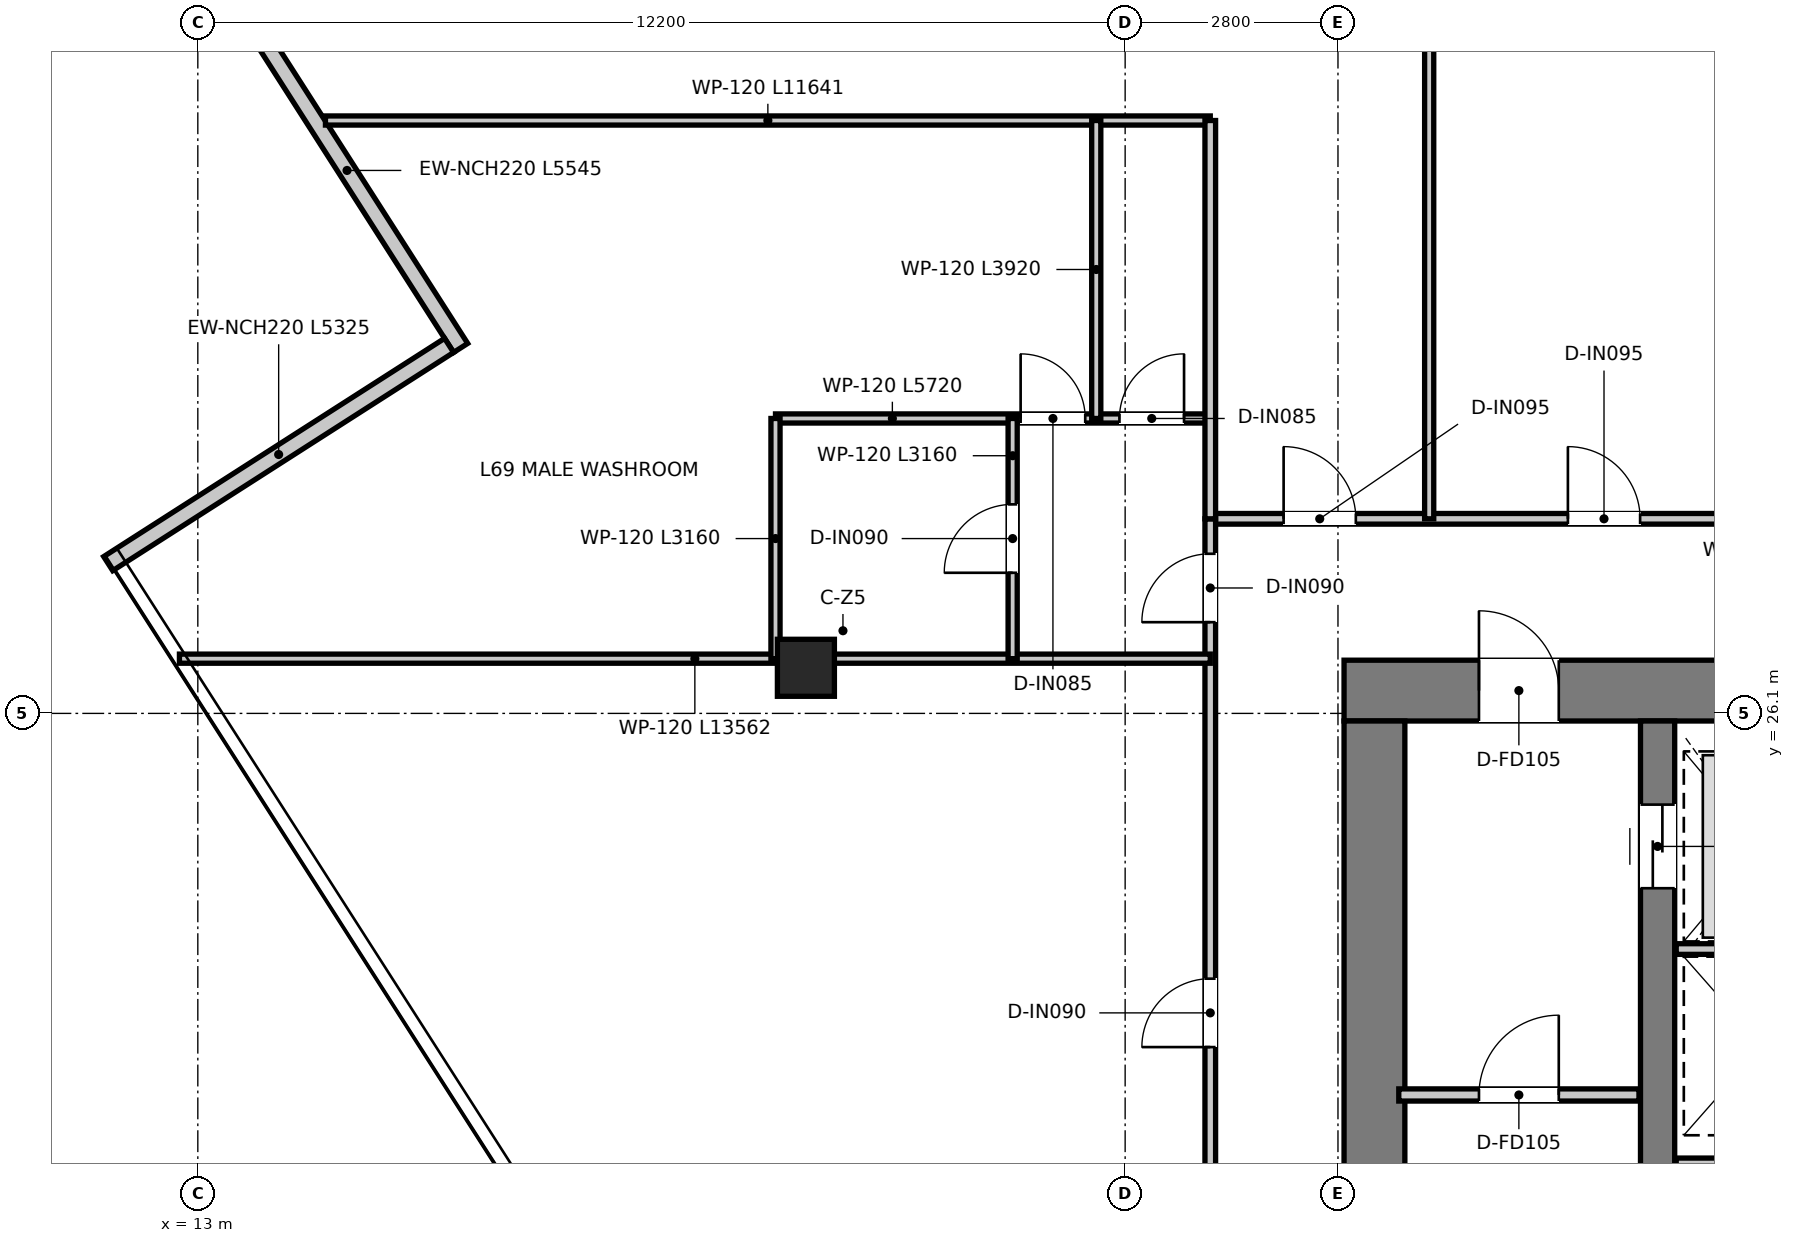
"""IFC4 building model, lengths in metres.
Left out: names, types, materials, properties, quantities, classifications, styles, units other than length and angle.
Written with IfcOpenShell. Run it as: python <this file> out.ifc"""

import sys

from ifc_helpers import new_model, si_unit, direction, frame, frame_2d, origin, origin_2d, place, context, subcontext, project, spatial, rectangle, extrude, source, transform, mapped, element, fill, save


model = new_model("IFC4")
c1 = context("Model", 3, precision=1e-05, world=origin(), true_north=direction((0.0, 1.0)))
c2 = subcontext(c1, "Body", "Model", "MODEL_VIEW")
j1 = project(units=[si_unit("LENGTHUNIT", "METRE"), si_unit("PLANEANGLEUNIT", "RADIAN")], contexts=[c1])
p1 = place(None, origin())
s1 = spatial("IfcSite", under=j1, at=p1, CompositionType="ELEMENT")
p2 = place(p1, origin())
s2 = spatial("IfcBuilding", under=s1, at=p2, CompositionType="ELEMENT")
p3 = place(p2, frame((0.0, 0.0, 283.2)))
s3 = spatial("IfcBuildingStorey", under=s2, at=p3, CompositionType="ELEMENT", Elevation=283.2)
p4 = place(p3, frame((28.08, 26.4, 0.0), z_axis=(0.0, 0.0, 1.0), x_axis=(1.0, 0.0, 0.0)))
e1 = element("IfcWall", 1, at=p4, inside=s3, PredefinedType="SHEAR", context=c2, shape_type="SweptSolid", body=[
    extrude(rectangle(XDim=15.84, YDim=0.8, at=frame_2d((7.92, 0.0))), origin(), (0.0, 0.0, 1.0), 3.95),
])
p5 = place(p4, frame((7.22, 0.0, 0.0)))
e2 = element("IfcOpeningElement", 2, at=p5, cuts=e1, PredefinedType="OPENING", context=c2, shape_type="SweptSolid", body=[
    extrude(rectangle(XDim=1.4, YDim=2.2, at=frame_2d((0.7, 1.1))), frame((0.0, 0.41, 0.0), z_axis=(0.0, -1.0, 0.0), x_axis=(1.0, 0.0, 0.0)), (0.0, 0.0, 1.0), 0.82),
])
p6 = place(p4, frame((1.775, 0.0, 0.0)))
e3 = element("IfcOpeningElement", 3, at=p6, cuts=e1, PredefinedType="OPENING", context=c2, shape_type="SweptSolid", body=[
    extrude(rectangle(XDim=1.05, YDim=2.1, at=frame_2d((0.525, 1.05))), frame((0.0, 0.41, 0.0), z_axis=(0.0, -1.0, 0.0), x_axis=(1.0, 0.0, 0.0)), (0.0, 0.0, 1.0), 0.82),
])
p7 = place(p4, frame((13.015, 0.0, 0.0)))
e4 = element("IfcOpeningElement", 4, at=p7, cuts=e1, PredefinedType="OPENING", context=c2, shape_type="SweptSolid", body=[
    extrude(rectangle(XDim=1.05, YDim=2.1, at=frame_2d((0.525, 1.05))), frame((0.0, 0.41, 0.0), z_axis=(0.0, -1.0, 0.0), x_axis=(1.0, 0.0, 0.0)), (0.0, 0.0, 1.0), 0.82),
])
p8 = place(p3, frame((28.48, 11.3, 0.0), z_axis=(0.0, 0.0, 1.0), x_axis=(0.0, 1.0, 0.0)))
e5 = element("IfcWall", 5, at=p8, inside=s3, PredefinedType="SHEAR", context=c2, shape_type="SweptSolid", body=[
    extrude(rectangle(XDim=14.7, YDim=0.8, at=frame_2d((7.35, 0.0))), origin(), (0.0, 0.0, 1.0), 3.95),
])
p9 = place(p3, frame((32.205, 13.22, 0.0), z_axis=(0.0, 0.0, 1.0), x_axis=(0.0, 1.0, 0.0)))
e6 = element("IfcWall", 6, at=p9, inside=s3, PredefinedType="SHEAR", context=c2, shape_type="SweptSolid", body=[
    extrude(rectangle(XDim=12.78, YDim=0.45, at=frame_2d((6.39, 0.0))), origin(), (0.0, 0.0, 1.0), 3.95),
])
p10 = place(p9, frame((10.58, 0.0, 0.0)))
e7 = element("IfcOpeningElement", 7, at=p10, cuts=e6, PredefinedType="OPENING", context=c2, shape_type="SweptSolid", body=[
    extrude(rectangle(XDim=1.1, YDim=2.15, at=frame_2d((0.55, 1.075))), frame((0.0, 0.235, 0.0), z_axis=(0.0, -1.0, 0.0), x_axis=(1.0, 0.0, 0.0)), (0.0, 0.0, 1.0), 0.47),
])
m1 = source(origin(), c2, "Body", "SweptSolid", [
    extrude(rectangle(XDim=0.75, YDim=0.75, at=origin_2d()), origin(), (0.0, 0.0, 1.0), 3.95),
])
p11 = place(p3, frame((21.0, 26.7, 0.0), z_axis=(0.0, 0.0, 1.0), x_axis=(1.0, 0.0, 0.0)))
e8 = element("IfcColumn", 8, at=p11, inside=s3, PredefinedType="COLUMN", context=c2, shape_type="MappedRepresentation", body=[
    mapped(m1, transform((0.0, 0.0, 0.0), x_axis=(1.0, 0.0, 0.0), y_axis=(0.0, 1.0, 0.0), z_axis=(0.0, 0.0, 1.0), scale=1.0)),
])
p12 = place(p3, frame((13.468, 35.578, 0.0), z_axis=(0.0, 0.0, 1.0), x_axis=(0.539129907131, -0.842222620948, 0.0)))
e9 = element("IfcWall", 9, at=p12, inside=s3, PredefinedType="ELEMENTEDWALL", context=c2, shape_type="SweptSolid", body=[
    extrude(rectangle(XDim=5.545, YDim=0.22, at=frame_2d((2.772, 0.0))), origin(), (0.0, 0.0, 1.0), 3.67),
])
p13 = place(p3, frame((16.306, 30.941, 0.0), z_axis=(0.0, 0.0, 1.0), x_axis=(-0.84222560178, -0.539125250481, 0.0)))
e10 = element("IfcWall", 10, at=p13, inside=s3, PredefinedType="ELEMENTEDWALL", context=c2, shape_type="SweptSolid", body=[
    extrude(rectangle(XDim=5.325, YDim=0.22, at=frame_2d((2.663, 0.0))), origin(), (0.0, 0.0, 1.0), 3.67),
])
p14 = place(p3, frame((28.8, 21.08, 0.0), z_axis=(0.0, 0.0, 1.0), x_axis=(1.0, 0.0, 0.0)))
e11 = element("IfcWall", 11, at=p14, inside=s3, PredefinedType="PARTITIONING", context=c2, shape_type="SweptSolid", body=[
    extrude(rectangle(XDim=3.16, YDim=0.16, at=frame_2d((1.58, 0.0))), origin(), (0.0, 0.0, 1.0), 3.67),
])
p15 = place(p14, frame((1.055, 0.0, 0.0)))
e12 = element("IfcOpeningElement", 12, at=p15, cuts=e11, PredefinedType="OPENING", context=c2, shape_type="SweptSolid", body=[
    extrude(rectangle(XDim=1.05, YDim=2.1, at=frame_2d((0.525, 1.05))), frame((0.0, 0.09, 0.0), z_axis=(0.0, -1.0, 0.0), x_axis=(1.0, 0.0, 0.0)), (0.0, 0.0, 1.0), 0.18),
])
p16 = place(p3, frame((32.45, 23.0, 0.0), z_axis=(0.0, 0.0, 1.0), x_axis=(1.0, 0.0, 0.0)))
e13 = element("IfcWall", 13, at=p16, inside=s3, PredefinedType="PARTITIONING", context=c2, shape_type="SweptSolid", body=[
    extrude(rectangle(XDim=2.27, YDim=0.14, at=frame_2d((1.135, 0.0))), origin(), (0.0, 0.0, 1.0), 2.82),
])
p17 = place(p3, frame((32.45, 20.18, 0.0), z_axis=(0.0, 0.0, 1.0), x_axis=(1.0, 0.0, 0.0)))
e14 = element("IfcWall", 14, at=p17, inside=s3, PredefinedType="PARTITIONING", context=c2, shape_type="SweptSolid", body=[
    extrude(rectangle(XDim=2.27, YDim=0.14, at=frame_2d((1.135, 0.0))), origin(), (0.0, 0.0, 1.0), 3.67),
])
p18 = place(p3, frame((26.32, 28.66, 0.0), z_axis=(0.0, 0.0, 1.0), x_axis=(1.0, 0.0, 0.0)))
e15 = element("IfcWall", 15, at=p18, inside=s3, PredefinedType="PARTITIONING", context=c2, shape_type="SweptSolid", body=[
    extrude(rectangle(XDim=19.36, YDim=0.14, at=frame_2d((9.68, 0.0))), origin(), (0.0, 0.0, 1.0), 3.18),
])
p19 = place(p18, frame((0.965, 0.0, 0.0)))
e16 = element("IfcOpeningElement", 16, at=p19, cuts=e15, PredefinedType="OPENING", context=c2, shape_type="SweptSolid", body=[
    extrude(rectangle(XDim=0.95, YDim=2.1, at=frame_2d((0.475, 1.05))), frame((0.0, 0.08, 0.0), z_axis=(0.0, -1.0, 0.0), x_axis=(1.0, 0.0, 0.0)), (0.0, 0.0, 1.0), 0.16),
])
p20 = place(p18, frame((4.705, 0.0, 0.0)))
e17 = element("IfcOpeningElement", 17, at=p20, cuts=e15, PredefinedType="OPENING", context=c2, shape_type="SweptSolid", body=[
    extrude(rectangle(XDim=0.95, YDim=2.1, at=frame_2d((0.475, 1.05))), frame((0.0, 0.08, 0.0), z_axis=(0.0, -1.0, 0.0), x_axis=(1.0, 0.0, 0.0)), (0.0, 0.0, 1.0), 0.16),
])
p21 = place(p18, frame((9.305, 0.0, 0.0)))
e18 = element("IfcOpeningElement", 18, at=p21, cuts=e15, PredefinedType="OPENING", context=c2, shape_type="SweptSolid", body=[
    extrude(rectangle(XDim=0.95, YDim=2.1, at=frame_2d((0.475, 1.05))), frame((0.0, 0.08, 0.0), z_axis=(0.0, -1.0, 0.0), x_axis=(1.0, 0.0, 0.0)), (0.0, 0.0, 1.0), 0.16),
])
p22 = place(p18, frame((13.805, 0.0, 0.0)))
e19 = element("IfcOpeningElement", 19, at=p22, cuts=e15, PredefinedType="OPENING", context=c2, shape_type="SweptSolid", body=[
    extrude(rectangle(XDim=0.95, YDim=2.1, at=frame_2d((0.475, 1.05))), frame((0.0, 0.08, 0.0), z_axis=(0.0, -1.0, 0.0), x_axis=(1.0, 0.0, 0.0)), (0.0, 0.0, 1.0), 0.16),
])
p23 = place(p18, frame((17.445, 0.0, 0.0)))
e20 = element("IfcOpeningElement", 20, at=p23, cuts=e15, PredefinedType="OPENING", context=c2, shape_type="SweptSolid", body=[
    extrude(rectangle(XDim=0.95, YDim=2.1, at=frame_2d((0.475, 1.05))), frame((0.0, 0.08, 0.0), z_axis=(0.0, -1.0, 0.0), x_axis=(1.0, 0.0, 0.0)), (0.0, 0.0, 1.0), 0.16),
])
p24 = place(p3, frame((26.32, 9.0, 0.0), z_axis=(0.0, 0.0, 1.0), x_axis=(0.0, 1.0, 0.0)))
e21 = element("IfcWall", 21, at=p24, inside=s3, PredefinedType="PARTITIONING", context=c2, shape_type="SweptSolid", body=[
    extrude(rectangle(XDim=19.66, YDim=0.14, at=frame_2d((9.83, 0.0))), origin(), (0.0, 0.0, 1.0), 3.13),
])
p25 = place(p24, frame((18.3, 0.0, 0.0)))
e22 = element("IfcOpeningElement", 22, at=p25, cuts=e21, PredefinedType="OPENING", context=c2, shape_type="SweptSolid", body=[
    extrude(rectangle(XDim=0.9, YDim=2.1, at=frame_2d((0.45, 1.05))), frame((0.0, 0.08, 0.0), z_axis=(0.0, -1.0, 0.0), x_axis=(1.0, 0.0, 0.0)), (0.0, 0.0, 1.0), 0.16),
])
p26 = place(p24, frame((12.71, 0.0, 0.0)))
e23 = element("IfcOpeningElement", 23, at=p26, cuts=e21, PredefinedType="OPENING", context=c2, shape_type="SweptSolid", body=[
    extrude(rectangle(XDim=0.9, YDim=2.1, at=frame_2d((0.45, 1.05))), frame((0.0, 0.08, 0.0), z_axis=(0.0, -1.0, 0.0), x_axis=(1.0, 0.0, 0.0)), (0.0, 0.0, 1.0), 0.16),
])
p27 = place(p3, frame((12.758, 26.82, 0.0), z_axis=(0.0, 0.0, 1.0), x_axis=(1.0, 0.0, 0.0)))
e24 = element("IfcWall", 24, at=p27, inside=s3, PredefinedType="PARTITIONING", context=c2, shape_type="SweptSolid", body=[
    extrude(rectangle(XDim=13.562, YDim=0.12, at=frame_2d((6.781, 0.0))), origin(), (0.0, 0.0, 1.0), 3.13),
])
p28 = place(p3, frame((14.679, 33.9, 0.0), z_axis=(0.0, 0.0, 1.0), x_axis=(1.0, 0.0, 0.0)))
e25 = element("IfcWall", 25, at=p28, inside=s3, PredefinedType="PARTITIONING", context=c2, shape_type="SweptSolid", body=[
    extrude(rectangle(XDim=11.641, YDim=0.12, at=frame_2d((5.82, 0.0))), origin(), (0.0, 0.0, 1.0), 3.13),
])
p29 = place(p3, frame((20.6, 29.98, 0.0), z_axis=(0.0, 0.0, 1.0), x_axis=(1.0, 0.0, 0.0)))
e26 = element("IfcWall", 26, at=p29, inside=s3, PredefinedType="PARTITIONING", context=c2, shape_type="SweptSolid", body=[
    extrude(rectangle(XDim=5.72, YDim=0.12, at=frame_2d((2.86, 0.0))), origin(), (0.0, 0.0, 1.0), 3.13),
])
p30 = place(p29, frame((3.225, 0.0, 0.0)))
e27 = element("IfcOpeningElement", 27, at=p30, cuts=e26, PredefinedType="OPENING", context=c2, shape_type="SweptSolid", body=[
    extrude(rectangle(XDim=0.85, YDim=2.1, at=frame_2d((0.425, 1.05))), frame((0.0, 0.07, 0.0), z_axis=(0.0, -1.0, 0.0), x_axis=(1.0, 0.0, 0.0)), (0.0, 0.0, 1.0), 0.14),
])
p31 = place(p29, frame((4.525, 0.0, 0.0)))
e28 = element("IfcOpeningElement", 28, at=p31, cuts=e26, PredefinedType="OPENING", context=c2, shape_type="SweptSolid", body=[
    extrude(rectangle(XDim=0.85, YDim=2.1, at=frame_2d((0.425, 1.05))), frame((0.0, 0.07, 0.0), z_axis=(0.0, -1.0, 0.0), x_axis=(1.0, 0.0, 0.0)), (0.0, 0.0, 1.0), 0.14),
])
p32 = place(p3, frame((20.6, 26.82, 0.0), z_axis=(0.0, 0.0, 1.0), x_axis=(0.0, 1.0, 0.0)))
e29 = element("IfcWall", 29, at=p32, inside=s3, PredefinedType="PARTITIONING", context=c2, shape_type="SweptSolid", body=[
    extrude(rectangle(XDim=3.16, YDim=0.12, at=frame_2d((1.58, 0.0))), origin(), (0.0, 0.0, 1.0), 3.67),
])
p33 = place(p3, frame((23.72, 26.82, 0.0), z_axis=(0.0, 0.0, 1.0), x_axis=(0.0, 1.0, 0.0)))
e30 = element("IfcWall", 30, at=p33, inside=s3, PredefinedType="PARTITIONING", context=c2, shape_type="SweptSolid", body=[
    extrude(rectangle(XDim=3.16, YDim=0.12, at=frame_2d((1.58, 0.0))), origin(), (0.0, 0.0, 1.0), 3.18),
])
p34 = place(p33, frame((1.13, 0.0, 0.0)))
e31 = element("IfcOpeningElement", 31, at=p34, cuts=e30, PredefinedType="OPENING", context=c2, shape_type="SweptSolid", body=[
    extrude(rectangle(XDim=0.9, YDim=2.1, at=frame_2d((0.45, 1.05))), frame((0.0, 0.07, 0.0), z_axis=(0.0, -1.0, 0.0), x_axis=(1.0, 0.0, 0.0)), (0.0, 0.0, 1.0), 0.14),
])
p35 = place(p3, frame((24.82, 29.98, 0.0), z_axis=(0.0, 0.0, 1.0), x_axis=(0.0, 1.0, 0.0)))
e32 = element("IfcWall", 32, at=p35, inside=s3, PredefinedType="PARTITIONING", context=c2, shape_type="SweptSolid", body=[
    extrude(rectangle(XDim=3.92, YDim=0.12, at=frame_2d((1.96, 0.0))), origin(), (0.0, 0.0, 1.0), 3.31),
])
p36 = place(p3, frame((26.32, 28.66, 0.0), z_axis=(0.0, 0.0, 1.0), x_axis=(0.0, 1.0, 0.0)))
e33 = element("IfcWall", 33, at=p36, inside=s3, PredefinedType="PARTITIONING", context=c2, shape_type="SweptSolid", body=[
    extrude(rectangle(XDim=5.24, YDim=0.14, at=frame_2d((2.62, 0.0))), origin(), (0.0, 0.0, 1.0), 3.43),
])
p37 = place(p3, frame((29.2, 28.66, 0.0), z_axis=(0.0, 0.0, 1.0), x_axis=(0.0, 1.0, 0.0)))
e34 = element("IfcWall", 34, at=p37, inside=s3, PredefinedType="PARTITIONING", context=c2, shape_type="SweptSolid", body=[
    extrude(rectangle(XDim=16.852, YDim=0.12, at=frame_2d((8.426, 0.0))), origin(), (0.0, 0.0, 1.0), 3.13),
])
p38 = place(p15, origin())
e35 = element("IfcDoor", 35, at=p38, inside=s3, OperationType="SINGLE_SWING_RIGHT", PredefinedType="DOOR", context=c2, shape_type="SweptSolid", body=[
    extrude(rectangle(XDim=1.05, YDim=2.1, at=frame_2d((0.525, 1.05))), frame((0.0, 0.025, 0.0), z_axis=(0.0, -1.0, 0.0), x_axis=(1.0, 0.0, 0.0)), (0.0, 0.0, 1.0), 0.05),
])
fill(e12, e35)
p39 = place(p6, origin())
e36 = element("IfcDoor", 36, at=p39, inside=s3, OperationType="SINGLE_SWING_LEFT", PredefinedType="DOOR", context=c2, shape_type="SweptSolid", body=[
    extrude(rectangle(XDim=1.05, YDim=2.1, at=frame_2d((0.525, 1.05))), frame((0.0, 0.025, 0.0), z_axis=(0.0, -1.0, 0.0), x_axis=(1.0, 0.0, 0.0)), (0.0, 0.0, 1.0), 0.05),
])
fill(e3, e36)
p40 = place(p10, origin())
e37 = element("IfcDoor", 37, at=p40, inside=s3, OperationType="DOUBLE_DOOR_SLIDING", PredefinedType="DOOR", context=c2, shape_type="SweptSolid", body=[
    extrude(rectangle(XDim=1.1, YDim=2.15, at=frame_2d((0.55, 1.075))), frame((0.0, 0.025, 0.0), z_axis=(0.0, -1.0, 0.0), x_axis=(1.0, 0.0, 0.0)), (0.0, 0.0, 1.0), 0.05),
])
fill(e7, e37)
p41 = place(p25, origin())
e38 = element("IfcDoor", 38, at=p41, inside=s3, OperationType="SINGLE_SWING_LEFT", PredefinedType="DOOR", context=c2, shape_type="SweptSolid", body=[
    extrude(rectangle(XDim=0.9, YDim=2.1, at=frame_2d((0.45, 1.05))), frame((0.0, 0.025, 0.0), z_axis=(0.0, -1.0, 0.0), x_axis=(1.0, 0.0, 0.0)), (0.0, 0.0, 1.0), 0.05),
])
fill(e22, e38)
p42 = place(p30, origin())
e39 = element("IfcDoor", 39, at=p42, inside=s3, OperationType="SINGLE_SWING_LEFT", PredefinedType="DOOR", context=c2, shape_type="SweptSolid", body=[
    extrude(rectangle(XDim=0.85, YDim=2.1, at=frame_2d((0.425, 1.05))), frame((0.0, 0.025, 0.0), z_axis=(0.0, -1.0, 0.0), x_axis=(1.0, 0.0, 0.0)), (0.0, 0.0, 1.0), 0.05),
])
fill(e27, e39)
p43 = place(p31, origin())
e40 = element("IfcDoor", 40, at=p43, inside=s3, OperationType="SINGLE_SWING_RIGHT", PredefinedType="DOOR", context=c2, shape_type="SweptSolid", body=[
    extrude(rectangle(XDim=0.85, YDim=2.1, at=frame_2d((0.425, 1.05))), frame((0.0, 0.025, 0.0), z_axis=(0.0, -1.0, 0.0), x_axis=(1.0, 0.0, 0.0)), (0.0, 0.0, 1.0), 0.05),
])
fill(e28, e40)
p44 = place(p34, origin())
e41 = element("IfcDoor", 41, at=p44, inside=s3, OperationType="SINGLE_SWING_LEFT", PredefinedType="DOOR", context=c2, shape_type="SweptSolid", body=[
    extrude(rectangle(XDim=0.9, YDim=2.1, at=frame_2d((0.45, 1.05))), frame((0.0, 0.025, 0.0), z_axis=(0.0, -1.0, 0.0), x_axis=(1.0, 0.0, 0.0)), (0.0, 0.0, 1.0), 0.05),
])
fill(e31, e41)
p45 = place(p19, origin())
e42 = element("IfcDoor", 42, at=p45, inside=s3, OperationType="SINGLE_SWING_LEFT", PredefinedType="DOOR", context=c2, shape_type="SweptSolid", body=[
    extrude(rectangle(XDim=0.95, YDim=2.1, at=frame_2d((0.475, 1.05))), frame((0.0, 0.025, 0.0), z_axis=(0.0, -1.0, 0.0), x_axis=(1.0, 0.0, 0.0)), (0.0, 0.0, 1.0), 0.05),
])
fill(e16, e42)
p46 = place(p20, origin())
e43 = element("IfcDoor", 43, at=p46, inside=s3, OperationType="SINGLE_SWING_LEFT", PredefinedType="DOOR", context=c2, shape_type="SweptSolid", body=[
    extrude(rectangle(XDim=0.95, YDim=2.1, at=frame_2d((0.475, 1.05))), frame((0.0, 0.025, 0.0), z_axis=(0.0, -1.0, 0.0), x_axis=(1.0, 0.0, 0.0)), (0.0, 0.0, 1.0), 0.05),
])
fill(e17, e43)
p47 = place(p26, origin())
e44 = element("IfcDoor", 44, at=p47, inside=s3, OperationType="SINGLE_SWING_LEFT", PredefinedType="DOOR", context=c2, shape_type="SweptSolid", body=[
    extrude(rectangle(XDim=0.9, YDim=2.1, at=frame_2d((0.45, 1.05))), frame((0.0, 0.025, 0.0), z_axis=(0.0, -1.0, 0.0), x_axis=(1.0, 0.0, 0.0)), (0.0, 0.0, 1.0), 0.05),
])
fill(e23, e44)
save(model, sys.argv[1])
